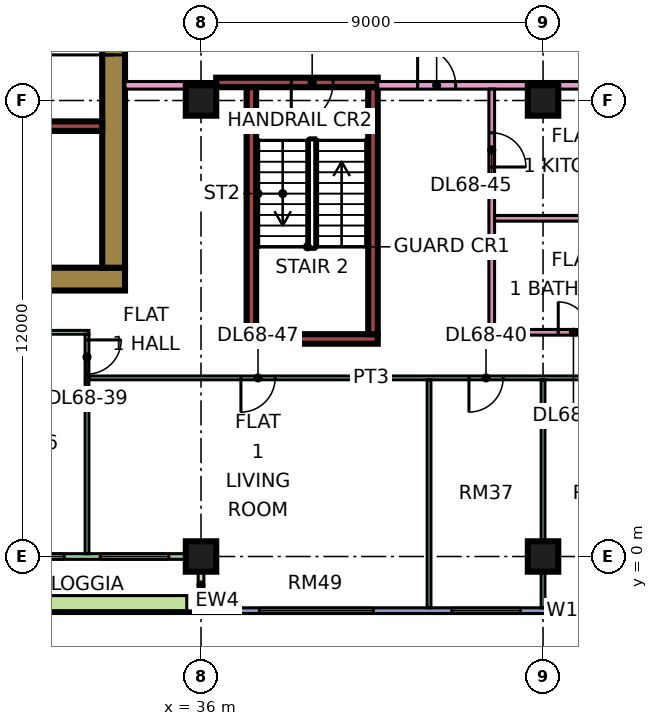
"""IFC4 building model, lengths in metres.
Left out: names, types, materials, properties, quantities, classifications, styles, units other than length and angle.
Written with IfcOpenShell. Run it as: python <this file> out.ifc"""

import sys

from ifc_helpers import new_model, si_unit, direction, frame, frame_2d, origin, origin_2d, place, context, subcontext, project, spatial, rectangle, extrude, element, fill, save


model = new_model("IFC4")
c1 = context("Model", 3, precision=1e-05, world=origin(), true_north=direction((0.0, 1.0)))
c2 = subcontext(c1, "Body", "Model", "MODEL_VIEW")
j1 = project(units=[si_unit("LENGTHUNIT", "METRE"), si_unit("PLANEANGLEUNIT", "RADIAN")], contexts=[c1])
p1 = place(None, origin())
s1 = spatial("IfcSite", under=j1, at=p1, CompositionType="ELEMENT")
p2 = place(p1, origin())
s2 = spatial("IfcBuilding", under=s1, at=p2, CompositionType="ELEMENT")
p3 = place(p2, frame((0.0, 0.0, 292.15)))
s3 = spatial("IfcBuildingStorey", under=s2, at=p3, CompositionType="ELEMENT", Elevation=292.15)
for number, where, z_axis, x_axis in (
    (1, (36.0, 0.0, 0.0), (0.0, 0.0, 1.0), (1.0, 0.0, 0.0)),
    (2, (36.0, 12.0, 0.0), (0.0, 0.0, 1.0), (1.0, 0.0, 0.0)),
    (3, (45.0, 0.0, 0.0), (0.0, 0.0, 1.0), (1.0, 0.0, 0.0)),
    (4, (45.0, 12.0, 0.0), (0.0, 0.0, 1.0), (1.0, 0.0, 0.0)),
):
    element("IfcColumn", number, at=place(p3, frame(where, z_axis=z_axis, x_axis=x_axis)), inside=s3, PredefinedType="COLUMN", context=c2, shape_type="SweptSolid", body=[
        extrude(rectangle(XDim=0.8, YDim=0.8, at=origin_2d()), origin(), (0.0, 0.0, 1.0), 3.75),
    ])
p4 = place(p3, frame((9.0, 7.3, 0.0), z_axis=(0.0, 0.0, 1.0), x_axis=(1.0, 0.0, 0.0)))
e5 = element("IfcWall", 5, at=p4, inside=s3, PredefinedType="SHEAR", context=c2, shape_type="SweptSolid", body=[
    extrude(rectangle(XDim=25.0, YDim=0.6, at=frame_2d((12.5, 0.0))), origin(), (0.0, 0.0, 1.0), 3.75),
])
p5 = place(p3, frame((33.7, 7.6, 0.0), z_axis=(0.0, 0.0, 1.0), x_axis=(0.0, 1.0, 0.0)))
e6 = element("IfcWall", 6, at=p5, inside=s3, PredefinedType="SHEAR", context=c2, shape_type="SweptSolid", body=[
    extrude(rectangle(XDim=11.8, YDim=0.6, at=frame_2d((5.9, 0.0))), origin(), (0.0, 0.0, 1.0), 3.75),
])
p6 = place(p5, frame((5.6, 0.0, 0.0)))
e7 = element("IfcOpeningElement", 7, at=p6, cuts=e6, PredefinedType="OPENING", context=c2, shape_type="SweptSolid", body=[
    extrude(rectangle(XDim=1.8, YDim=2.4, at=frame_2d((0.9, 1.2))), frame((0.0, 0.31, 0.0), z_axis=(0.0, -1.0, 0.0), x_axis=(1.0, 0.0, 0.0)), (0.0, 0.0, 1.0), 0.62),
])
p7 = place(p3, frame((13.45, 11.325, 0.0), z_axis=(0.0, 0.0, 1.0), x_axis=(1.0, 0.0, 0.0)))
e8 = element("IfcWall", 8, at=p7, inside=s3, PredefinedType="SHEAR", context=c2, shape_type="SweptSolid", body=[
    extrude(rectangle(XDim=19.95, YDim=0.25, at=frame_2d((9.975, 0.0))), origin(), (0.0, 0.0, 1.0), 3.75),
])
p8 = place(p7, frame((1.55, 0.0, 0.0)))
e9 = element("IfcOpeningElement", 9, at=p8, cuts=e8, PredefinedType="OPENING", context=c2, shape_type="SweptSolid", body=[
    extrude(rectangle(XDim=0.9, YDim=2.1, at=frame_2d((0.45, 1.05))), frame((0.0, 0.135, 0.0), z_axis=(0.0, -1.0, 0.0), x_axis=(1.0, 0.0, 0.0)), (0.0, 0.0, 1.0), 0.27),
])
p9 = place(p7, frame((5.05, 0.0, 0.0)))
e10 = element("IfcOpeningElement", 10, at=p9, cuts=e8, PredefinedType="OPENING", context=c2, shape_type="SweptSolid", body=[
    extrude(rectangle(XDim=0.9, YDim=2.1, at=frame_2d((0.45, 1.05))), frame((0.0, 0.135, 0.0), z_axis=(0.0, -1.0, 0.0), x_axis=(1.0, 0.0, 0.0)), (0.0, 0.0, 1.0), 0.27),
])
p10 = place(p7, frame((8.425, 0.0, 0.0)))
e11 = element("IfcOpeningElement", 11, at=p10, cuts=e8, PredefinedType="OPENING", context=c2, shape_type="SweptSolid", body=[
    extrude(rectangle(XDim=0.9, YDim=2.1, at=frame_2d((0.45, 1.05))), frame((0.0, 0.135, 0.0), z_axis=(0.0, -1.0, 0.0), x_axis=(1.0, 0.0, 0.0)), (0.0, 0.0, 1.0), 0.27),
])
p11 = place(p7, frame((15.025, 0.0, 0.0)))
e12 = element("IfcOpeningElement", 12, at=p11, cuts=e8, PredefinedType="OPENING", context=c2, shape_type="SweptSolid", body=[
    extrude(rectangle(XDim=0.9, YDim=2.1, at=frame_2d((0.45, 1.05))), frame((0.0, 0.135, 0.0), z_axis=(0.0, -1.0, 0.0), x_axis=(1.0, 0.0, 0.0)), (0.0, 0.0, 1.0), 0.27),
])
p12 = place(p3, frame((37.2, 5.725, 0.0), z_axis=(0.0, 0.0, 1.0), x_axis=(1.0, 0.0, 0.0)))
e13 = element("IfcWall", 13, at=p12, inside=s3, PredefinedType="SHEAR", context=c2, shape_type="SweptSolid", body=[
    extrude(rectangle(XDim=3.45, YDim=0.25, at=frame_2d((1.725, 0.0))), origin(), (0.0, 0.0, 1.0), 3.75),
])
p13 = place(p3, frame((36.4, 12.475, 0.0), z_axis=(0.0, 0.0, 1.0), x_axis=(1.0, 0.0, 0.0)))
e14 = element("IfcWall", 14, at=p13, inside=s3, PredefinedType="SHEAR", context=c2, shape_type="SweptSolid", body=[
    extrude(rectangle(XDim=4.25, YDim=0.25, at=frame_2d((2.125, 0.0))), origin(), (0.0, 0.0, 1.0), 3.75),
])
p14 = place(p13, frame((1.975, 0.0, 0.0)))
e15 = element("IfcOpeningElement", 15, at=p14, cuts=e14, PredefinedType="OPENING", context=c2, shape_type="SweptSolid", body=[
    extrude(rectangle(XDim=1.1, YDim=2.2, at=frame_2d((0.55, 1.1))), frame((0.0, 0.135, 0.0), z_axis=(0.0, -1.0, 0.0), x_axis=(1.0, 0.0, 0.0)), (0.0, 0.0, 1.0), 0.27),
])
for number, where, z_axis, x_axis in (
    (16, (37.325, 5.85, 0.0), (0.0, 0.0, 1.0), (0.0, 1.0, 0.0)),
    (17, (40.525, 5.85, 0.0), (0.0, 0.0, 1.0), (0.0, 1.0, 0.0)),
):
    element("IfcWall", number, at=place(p3, frame(where, z_axis=z_axis, x_axis=x_axis)), inside=s3, PredefinedType="SHEAR", context=c2, shape_type="SweptSolid", body=[
        extrude(rectangle(XDim=6.5, YDim=0.25, at=frame_2d((3.25, 0.0))), origin(), (0.0, 0.0, 1.0), 3.75),
    ])
p15 = place(p3, frame((24.075, 0.0, 0.0), z_axis=(0.0, 0.0, 1.0), x_axis=(1.0, 0.0, 0.0)))
e18 = element("IfcWall", 18, at=p15, inside=s3, PredefinedType="SOLIDWALL", context=c2, shape_type="SweptSolid", body=[
    extrude(rectangle(XDim=11.85, YDim=0.15, at=frame_2d((5.925, 0.0))), origin(), (0.0, 0.0, 1.0), 3.35),
])
p16 = place(p15, frame((0.775, 0.0, 0.45)))
e19 = element("IfcOpeningElement", 19, at=p16, cuts=e18, PredefinedType="OPENING", context=c2, shape_type="SweptSolid", body=[
    extrude(rectangle(XDim=1.8, YDim=2.4, at=frame_2d((0.9, 1.2))), frame((0.0, 0.085, 0.0), z_axis=(0.0, -1.0, 0.0), x_axis=(1.0, 0.0, 0.0)), (0.0, 0.0, 1.0), 0.17),
])
p17 = place(p15, frame((3.525, 0.0, 0.0)))
e20 = element("IfcOpeningElement", 20, at=p17, cuts=e18, PredefinedType="OPENING", context=c2, shape_type="SweptSolid", body=[
    extrude(rectangle(XDim=1.8, YDim=2.4, at=frame_2d((0.9, 1.2))), frame((0.0, 0.085, 0.0), z_axis=(0.0, -1.0, 0.0), x_axis=(1.0, 0.0, 0.0)), (0.0, 0.0, 1.0), 0.17),
])
p18 = place(p15, frame((6.525, 0.0, 0.45)))
e21 = element("IfcOpeningElement", 21, at=p18, cuts=e18, PredefinedType="OPENING", context=c2, shape_type="SweptSolid", body=[
    extrude(rectangle(XDim=1.8, YDim=2.4, at=frame_2d((0.9, 1.2))), frame((0.0, 0.085, 0.0), z_axis=(0.0, -1.0, 0.0), x_axis=(1.0, 0.0, 0.0)), (0.0, 0.0, 1.0), 0.17),
])
p19 = place(p15, frame((9.275, 0.0, 0.45)))
e22 = element("IfcOpeningElement", 22, at=p19, cuts=e18, PredefinedType="OPENING", context=c2, shape_type="SweptSolid", body=[
    extrude(rectangle(XDim=1.8, YDim=2.4, at=frame_2d((0.9, 1.2))), frame((0.0, 0.085, 0.0), z_axis=(0.0, -1.0, 0.0), x_axis=(1.0, 0.0, 0.0)), (0.0, 0.0, 1.0), 0.17),
])
p20 = place(p3, frame((36.0, -1.5, 0.0), z_axis=(0.0, 0.0, 1.0), x_axis=(0.0, 1.0, 0.0)))
e23 = element("IfcWall", 23, at=p20, inside=s3, PredefinedType="SOLIDWALL", context=c2, shape_type="SweptSolid", body=[
    extrude(rectangle(XDim=1.5, YDim=0.15, at=frame_2d((0.75, 0.0))), origin(), (0.0, 0.0, 1.0), 3.35),
])
p21 = place(p3, frame((36.075, -1.425, 0.0), z_axis=(0.0, 0.0, 1.0), x_axis=(1.0, 0.0, 0.0)))
e24 = element("IfcWall", 24, at=p21, inside=s3, PredefinedType="SOLIDWALL", context=c2, shape_type="SweptSolid", body=[
    extrude(rectangle(XDim=11.85, YDim=0.15, at=frame_2d((5.925, 0.0))), origin(), (0.0, 0.0, 1.0), 3.35),
])
p22 = place(p21, frame((1.462, 0.0, 0.45)))
e25 = element("IfcOpeningElement", 25, at=p22, cuts=e24, PredefinedType="OPENING", context=c2, shape_type="SweptSolid", body=[
    extrude(rectangle(XDim=3.0, YDim=2.4, at=frame_2d((1.5, 1.2))), frame((0.0, 0.085, 0.0), z_axis=(0.0, -1.0, 0.0), x_axis=(1.0, 0.0, 0.0)), (0.0, 0.0, 1.0), 0.17),
])
p23 = place(p21, frame((6.525, 0.0, 0.45)))
e26 = element("IfcOpeningElement", 26, at=p23, cuts=e24, PredefinedType="OPENING", context=c2, shape_type="SweptSolid", body=[
    extrude(rectangle(XDim=1.8, YDim=2.4, at=frame_2d((0.9, 1.2))), frame((0.0, 0.085, 0.0), z_axis=(0.0, -1.0, 0.0), x_axis=(1.0, 0.0, 0.0)), (0.0, 0.0, 1.0), 0.17),
])
p24 = place(p21, frame((9.488, 0.0, 0.45)))
e27 = element("IfcOpeningElement", 27, at=p24, cuts=e24, PredefinedType="OPENING", context=c2, shape_type="SweptSolid", body=[
    extrude(rectangle(XDim=1.8, YDim=2.4, at=frame_2d((0.9, 1.2))), frame((0.0, 0.085, 0.0), z_axis=(0.0, -1.0, 0.0), x_axis=(1.0, 0.0, 0.0)), (0.0, 0.0, 1.0), 0.17),
])
p25 = place(p3, frame((24.375, -1.229, 0.0), z_axis=(0.0, 0.0, 1.0), x_axis=(1.0, 0.0, 0.0)))
e28 = element("IfcWall", 28, at=p25, inside=s3, PredefinedType="SOLIDWALL", context=c2, shape_type="SweptSolid", body=[
    extrude(rectangle(XDim=11.25, YDim=0.4, at=frame_2d((5.625, 0.0))), origin(), (0.0, 0.0, 1.0), 0.7),
])
p26 = place(p3, frame((11.95, 5.9, 0.0), z_axis=(0.0, 0.0, 1.0), x_axis=(1.0, 0.0, 0.0)))
e29 = element("IfcWall", 29, at=p26, inside=s3, PredefinedType="PARTITIONING", context=c2, shape_type="SweptSolid", body=[
    extrude(rectangle(XDim=21.1, YDim=0.1, at=frame_2d((10.55, 0.0))), origin(), (0.0, 0.0, 1.0), 3.35),
])
p27 = place(p26, frame((1.1, 0.0, 0.0)))
e30 = element("IfcOpeningElement", 30, at=p27, cuts=e29, PredefinedType="OPENING", context=c2, shape_type="SweptSolid", body=[
    extrude(rectangle(XDim=0.9, YDim=2.1, at=frame_2d((0.45, 1.05))), frame((0.0, 0.06, 0.0), z_axis=(0.0, -1.0, 0.0), x_axis=(1.0, 0.0, 0.0)), (0.0, 0.0, 1.0), 0.12),
])
p28 = place(p26, frame((13.1, 0.0, 0.0)))
e31 = element("IfcOpeningElement", 31, at=p28, cuts=e29, PredefinedType="OPENING", context=c2, shape_type="SweptSolid", body=[
    extrude(rectangle(XDim=0.9, YDim=2.1, at=frame_2d((0.45, 1.05))), frame((0.0, 0.06, 0.0), z_axis=(0.0, -1.0, 0.0), x_axis=(1.0, 0.0, 0.0)), (0.0, 0.0, 1.0), 0.12),
])
p29 = place(p26, frame((16.1, 0.0, 0.0)))
e32 = element("IfcOpeningElement", 32, at=p29, cuts=e29, PredefinedType="OPENING", context=c2, shape_type="SweptSolid", body=[
    extrude(rectangle(XDim=0.9, YDim=2.1, at=frame_2d((0.45, 1.05))), frame((0.0, 0.06, 0.0), z_axis=(0.0, -1.0, 0.0), x_axis=(1.0, 0.0, 0.0)), (0.0, 0.0, 1.0), 0.12),
])
p30 = place(p26, frame((7.1, 0.0, 0.0)))
e33 = element("IfcOpeningElement", 33, at=p30, cuts=e29, PredefinedType="OPENING", context=c2, shape_type="SweptSolid", body=[
    extrude(rectangle(XDim=0.9, YDim=2.1, at=frame_2d((0.45, 1.05))), frame((0.0, 0.06, 0.0), z_axis=(0.0, -1.0, 0.0), x_axis=(1.0, 0.0, 0.0)), (0.0, 0.0, 1.0), 0.12),
])
p31 = place(p3, frame((33.0, 0.074, 0.0), z_axis=(0.0, 0.0, 1.0), x_axis=(0.0, 1.0, 0.0)))
e34 = element("IfcWall", 34, at=p31, inside=s3, PredefinedType="PARTITIONING", context=c2, shape_type="SweptSolid", body=[
    extrude(rectangle(XDim=5.776, YDim=0.1, at=frame_2d((2.888, 0.0))), origin(), (0.0, 0.0, 1.0), 3.35),
])
p32 = place(p31, frame((4.726, 0.0, 0.0)))
e35 = element("IfcOpeningElement", 35, at=p32, cuts=e34, PredefinedType="OPENING", context=c2, shape_type="SweptSolid", body=[
    extrude(rectangle(XDim=0.9, YDim=2.1, at=frame_2d((0.45, 1.05))), frame((0.0, 0.06, 0.0), z_axis=(0.0, -1.0, 0.0), x_axis=(1.0, 0.0, 0.0)), (0.0, 0.0, 1.0), 0.12),
])
p33 = place(p3, frame((33.05, 4.7, 0.0), z_axis=(0.0, 0.0, 1.0), x_axis=(1.0, 0.0, 0.0)))
e36 = element("IfcWall", 36, at=p33, inside=s3, PredefinedType="PARTITIONING", context=c2, shape_type="SweptSolid", body=[
    extrude(rectangle(XDim=14.85, YDim=0.1, at=frame_2d((7.425, 0.0))), origin(), (0.0, 0.0, 1.0), 3.35),
])
p34 = place(p33, frame((10.0, 0.0, 0.0)))
e37 = element("IfcOpeningElement", 37, at=p34, cuts=e36, PredefinedType="OPENING", context=c2, shape_type="SweptSolid", body=[
    extrude(rectangle(XDim=0.9, YDim=2.1, at=frame_2d((0.45, 1.05))), frame((0.0, 0.06, 0.0), z_axis=(0.0, -1.0, 0.0), x_axis=(1.0, 0.0, 0.0)), (0.0, 0.0, 1.0), 0.12),
])
p35 = place(p33, frame((13.0, 0.0, 0.0)))
e38 = element("IfcOpeningElement", 38, at=p35, cuts=e36, PredefinedType="OPENING", context=c2, shape_type="SweptSolid", body=[
    extrude(rectangle(XDim=0.9, YDim=2.1, at=frame_2d((0.45, 1.05))), frame((0.0, 0.06, 0.0), z_axis=(0.0, -1.0, 0.0), x_axis=(1.0, 0.0, 0.0)), (0.0, 0.0, 1.0), 0.12),
])
p36 = place(p33, frame((4.0, 0.0, 0.0)))
e39 = element("IfcOpeningElement", 39, at=p36, cuts=e36, PredefinedType="OPENING", context=c2, shape_type="SweptSolid", body=[
    extrude(rectangle(XDim=0.9, YDim=2.1, at=frame_2d((0.45, 1.05))), frame((0.0, 0.06, 0.0), z_axis=(0.0, -1.0, 0.0), x_axis=(1.0, 0.0, 0.0)), (0.0, 0.0, 1.0), 0.12),
])
p37 = place(p3, frame((34.0, 12.4, 0.0), z_axis=(0.0, 0.0, 1.0), x_axis=(1.0, 0.0, 0.0)))
e40 = element("IfcWall", 40, at=p37, inside=s3, PredefinedType="PARTITIONING", context=c2, shape_type="SweptSolid", body=[
    extrude(rectangle(XDim=2.401, YDim=0.2, at=frame_2d((1.2, 0.0))), origin(), (0.0, 0.0, 1.0), 3.35),
])
p38 = place(p3, frame((40.65, 12.4, 0.0), z_axis=(0.0, 0.0, 1.0), x_axis=(1.0, 0.0, 0.0)))
e41 = element("IfcWall", 41, at=p38, inside=s3, PredefinedType="PARTITIONING", context=c2, shape_type="SweptSolid", body=[
    extrude(rectangle(XDim=22.35, YDim=0.2, at=frame_2d((11.175, 0.0))), origin(), (0.0, 0.0, 1.0), 3.35),
])
p39 = place(p38, frame((20.25, 0.0, 0.0)))
e42 = element("IfcOpeningElement", 42, at=p39, cuts=e41, PredefinedType="OPENING", context=c2, shape_type="SweptSolid", body=[
    extrude(rectangle(XDim=1.0, YDim=2.1, at=frame_2d((0.5, 1.05))), frame((0.0, 0.11, 0.0), z_axis=(0.0, -1.0, 0.0), x_axis=(1.0, 0.0, 0.0)), (0.0, 0.0, 1.0), 0.22),
])
p40 = place(p38, frame((1.05, 0.0, 0.0)))
e43 = element("IfcOpeningElement", 43, at=p40, cuts=e41, PredefinedType="OPENING", context=c2, shape_type="SweptSolid", body=[
    extrude(rectangle(XDim=1.0, YDim=2.1, at=frame_2d((0.5, 1.05))), frame((0.0, 0.11, 0.0), z_axis=(0.0, -1.0, 0.0), x_axis=(1.0, 0.0, 0.0)), (0.0, 0.0, 1.0), 0.22),
])
p41 = place(p3, frame((42.0, -1.35, 0.0), z_axis=(0.0, 0.0, 1.0), x_axis=(0.0, 1.0, 0.0)))
e44 = element("IfcWall", 44, at=p41, inside=s3, PredefinedType="PARTITIONING", context=c2, shape_type="SweptSolid", body=[
    extrude(rectangle(XDim=6.0, YDim=0.1, at=frame_2d((3.0, 0.0))), origin(), (0.0, 0.0, 1.0), 3.35),
])
p42 = place(p3, frame((43.65, 5.825, 0.0), z_axis=(0.0, 0.0, 1.0), x_axis=(0.0, 1.0, 0.0)))
e45 = element("IfcWall", 45, at=p42, inside=s3, PredefinedType="PARTITIONING", context=c2, shape_type="SweptSolid", body=[
    extrude(rectangle(XDim=6.475, YDim=0.15, at=frame_2d((3.238, 0.0))), origin(), (0.0, 0.0, 1.0), 3.35),
])
p43 = place(p42, frame((4.425, 0.0, 0.0)))
e46 = element("IfcOpeningElement", 46, at=p43, cuts=e45, PredefinedType="OPENING", context=c2, shape_type="SweptSolid", body=[
    extrude(rectangle(XDim=0.9, YDim=2.1, at=frame_2d((0.45, 1.05))), frame((0.0, 0.085, 0.0), z_axis=(0.0, -1.0, 0.0), x_axis=(1.0, 0.0, 0.0)), (0.0, 0.0, 1.0), 0.17),
])
p44 = place(p3, frame((43.725, 5.9, 0.0), z_axis=(0.0, 0.0, 1.0), x_axis=(1.0, 0.0, 0.0)))
e47 = element("IfcWall", 47, at=p44, inside=s3, PredefinedType="PARTITIONING", context=c2, shape_type="SweptSolid", body=[
    extrude(rectangle(XDim=4.175, YDim=0.15, at=frame_2d((2.087, 0.0))), origin(), (0.0, 0.0, 1.0), 3.35),
])
p45 = place(p44, frame((1.675, 0.0, 0.0)))
e48 = element("IfcOpeningElement", 48, at=p45, cuts=e47, PredefinedType="OPENING", context=c2, shape_type="SweptSolid", body=[
    extrude(rectangle(XDim=0.8, YDim=2.1, at=frame_2d((0.4, 1.05))), frame((0.0, 0.085, 0.0), z_axis=(0.0, -1.0, 0.0), x_axis=(1.0, 0.0, 0.0)), (0.0, 0.0, 1.0), 0.17),
])
p46 = place(p3, frame((43.725, 8.9, 0.0), z_axis=(0.0, 0.0, 1.0), x_axis=(1.0, 0.0, 0.0)))
e49 = element("IfcWall", 49, at=p46, inside=s3, PredefinedType="PARTITIONING", context=c2, shape_type="SweptSolid", body=[
    extrude(rectangle(XDim=4.175, YDim=0.15, at=frame_2d((2.087, 0.0))), origin(), (0.0, 0.0, 1.0), 3.35),
])
p47 = place(p3, frame((45.0, -1.351, 0.0), z_axis=(0.0, 0.0, 1.0), x_axis=(0.0, 1.0, 0.0)))
e50 = element("IfcWall", 50, at=p47, inside=s3, PredefinedType="PARTITIONING", context=c2, shape_type="SweptSolid", body=[
    extrude(rectangle(XDim=6.001, YDim=0.1, at=frame_2d((3.0, 0.0))), origin(), (0.0, 0.0, 1.0), 3.35),
])
p48 = place(p18, origin())
e51 = element("IfcWindow", 51, at=p48, inside=s3, PartitioningType="SINGLE_PANEL", PredefinedType="WINDOW", context=c2, shape_type="SweptSolid", body=[
    extrude(rectangle(XDim=1.8, YDim=2.4, at=frame_2d((0.9, 1.2))), frame((0.0, 0.03, 0.0), z_axis=(0.0, -1.0, 0.0), x_axis=(1.0, 0.0, 0.0)), (0.0, 0.0, 1.0), 0.06),
])
fill(e21, e51)
p49 = place(p19, origin())
e52 = element("IfcWindow", 52, at=p49, inside=s3, PartitioningType="SINGLE_PANEL", PredefinedType="WINDOW", context=c2, shape_type="SweptSolid", body=[
    extrude(rectangle(XDim=1.8, YDim=2.4, at=frame_2d((0.9, 1.2))), frame((0.0, 0.03, 0.0), z_axis=(0.0, -1.0, 0.0), x_axis=(1.0, 0.0, 0.0)), (0.0, 0.0, 1.0), 0.06),
])
fill(e22, e52)
p50 = place(p22, origin())
e53 = element("IfcWindow", 53, at=p50, inside=s3, PartitioningType="SINGLE_PANEL", PredefinedType="WINDOW", context=c2, shape_type="SweptSolid", body=[
    extrude(rectangle(XDim=3.0, YDim=2.4, at=frame_2d((1.5, 1.2))), frame((0.0, 0.03, 0.0), z_axis=(0.0, -1.0, 0.0), x_axis=(1.0, 0.0, 0.0)), (0.0, 0.0, 1.0), 0.06),
])
fill(e25, e53)
p51 = place(p23, origin())
e54 = element("IfcWindow", 54, at=p51, inside=s3, PartitioningType="SINGLE_PANEL", PredefinedType="WINDOW", context=c2, shape_type="SweptSolid", body=[
    extrude(rectangle(XDim=1.8, YDim=2.4, at=frame_2d((0.9, 1.2))), frame((0.0, 0.03, 0.0), z_axis=(0.0, -1.0, 0.0), x_axis=(1.0, 0.0, 0.0)), (0.0, 0.0, 1.0), 0.06),
])
fill(e26, e54)
p52 = place(p24, origin())
e55 = element("IfcWindow", 55, at=p52, inside=s3, PartitioningType="SINGLE_PANEL", PredefinedType="WINDOW", context=c2, shape_type="SweptSolid", body=[
    extrude(rectangle(XDim=1.8, YDim=2.4, at=frame_2d((0.9, 1.2))), frame((0.0, 0.03, 0.0), z_axis=(0.0, -1.0, 0.0), x_axis=(1.0, 0.0, 0.0)), (0.0, 0.0, 1.0), 0.06),
])
fill(e27, e55)
p53 = place(p6, origin())
e56 = element("IfcDoor", 56, at=p53, inside=s3, OperationType="DOUBLE_DOOR_SINGLE_SWING", PredefinedType="DOOR", context=c2, shape_type="SweptSolid", body=[
    extrude(rectangle(XDim=1.8, YDim=2.4, at=frame_2d((0.9, 1.2))), frame((0.0, 0.025, 0.0), z_axis=(0.0, -1.0, 0.0), x_axis=(1.0, 0.0, 0.0)), (0.0, 0.0, 1.0), 0.05),
])
fill(e7, e56)
p54 = place(p14, frame((1.1, 0.0, 0.0), z_axis=(0.0, 0.0, 1.0), x_axis=(-1.0, 0.0, 0.0)))
e57 = element("IfcDoor", 57, at=p54, inside=s3, OperationType="SINGLE_SWING_LEFT", PredefinedType="DOOR", context=c2, shape_type="SweptSolid", body=[
    extrude(rectangle(XDim=1.1, YDim=2.2, at=frame_2d((0.55, 1.1))), frame((0.0, 0.025, 0.0), z_axis=(0.0, -1.0, 0.0), x_axis=(1.0, 0.0, 0.0)), (0.0, 0.0, 1.0), 0.05),
])
fill(e15, e57)
p55 = place(p45, origin())
e58 = element("IfcDoor", 58, at=p55, inside=s3, OperationType="SINGLE_SWING_LEFT", PredefinedType="DOOR", context=c2, shape_type="SweptSolid", body=[
    extrude(rectangle(XDim=0.8, YDim=2.1, at=frame_2d((0.4, 1.05))), frame((0.0, 0.025, 0.0), z_axis=(0.0, -1.0, 0.0), x_axis=(1.0, 0.0, 0.0)), (0.0, 0.0, 1.0), 0.05),
])
fill(e48, e58)
p56 = place(p32, origin())
e59 = element("IfcDoor", 59, at=p56, inside=s3, OperationType="SINGLE_SWING_RIGHT", PredefinedType="DOOR", context=c2, shape_type="SweptSolid", body=[
    extrude(rectangle(XDim=0.9, YDim=2.1, at=frame_2d((0.45, 1.05))), frame((0.0, 0.025, 0.0), z_axis=(0.0, -1.0, 0.0), x_axis=(1.0, 0.0, 0.0)), (0.0, 0.0, 1.0), 0.05),
])
fill(e35, e59)
p57 = place(p34, frame((0.9, 0.0, 0.0), z_axis=(0.0, 0.0, 1.0), x_axis=(-1.0, 0.0, 0.0)))
e60 = element("IfcDoor", 60, at=p57, inside=s3, OperationType="SINGLE_SWING_LEFT", PredefinedType="DOOR", context=c2, shape_type="SweptSolid", body=[
    extrude(rectangle(XDim=0.9, YDim=2.1, at=frame_2d((0.45, 1.05))), frame((0.0, 0.025, 0.0), z_axis=(0.0, -1.0, 0.0), x_axis=(1.0, 0.0, 0.0)), (0.0, 0.0, 1.0), 0.05),
])
fill(e37, e60)
p58 = place(p40, origin())
e61 = element("IfcDoor", 61, at=p58, inside=s3, OperationType="SINGLE_SWING_LEFT", PredefinedType="DOOR", context=c2, shape_type="SweptSolid", body=[
    extrude(rectangle(XDim=1.0, YDim=2.1, at=frame_2d((0.5, 1.05))), frame((0.0, 0.025, 0.0), z_axis=(0.0, -1.0, 0.0), x_axis=(1.0, 0.0, 0.0)), (0.0, 0.0, 1.0), 0.05),
])
fill(e43, e61)
p59 = place(p43, frame((0.9, 0.0, 0.0), z_axis=(0.0, 0.0, 1.0), x_axis=(-1.0, 0.0, 0.0)))
e62 = element("IfcDoor", 62, at=p59, inside=s3, OperationType="SINGLE_SWING_LEFT", PredefinedType="DOOR", context=c2, shape_type="SweptSolid", body=[
    extrude(rectangle(XDim=0.9, YDim=2.1, at=frame_2d((0.45, 1.05))), frame((0.0, 0.025, 0.0), z_axis=(0.0, -1.0, 0.0), x_axis=(1.0, 0.0, 0.0)), (0.0, 0.0, 1.0), 0.05),
])
fill(e46, e62)
p60 = place(p36, frame((0.9, 0.0, 0.0), z_axis=(0.0, 0.0, 1.0), x_axis=(-1.0, 0.0, 0.0)))
e63 = element("IfcDoor", 63, at=p60, inside=s3, OperationType="SINGLE_SWING_LEFT", PredefinedType="DOOR", context=c2, shape_type="SweptSolid", body=[
    extrude(rectangle(XDim=0.9, YDim=2.1, at=frame_2d((0.45, 1.05))), frame((0.0, 0.025, 0.0), z_axis=(0.0, -1.0, 0.0), x_axis=(1.0, 0.0, 0.0)), (0.0, 0.0, 1.0), 0.05),
])
fill(e39, e63)
save(model, sys.argv[1])
